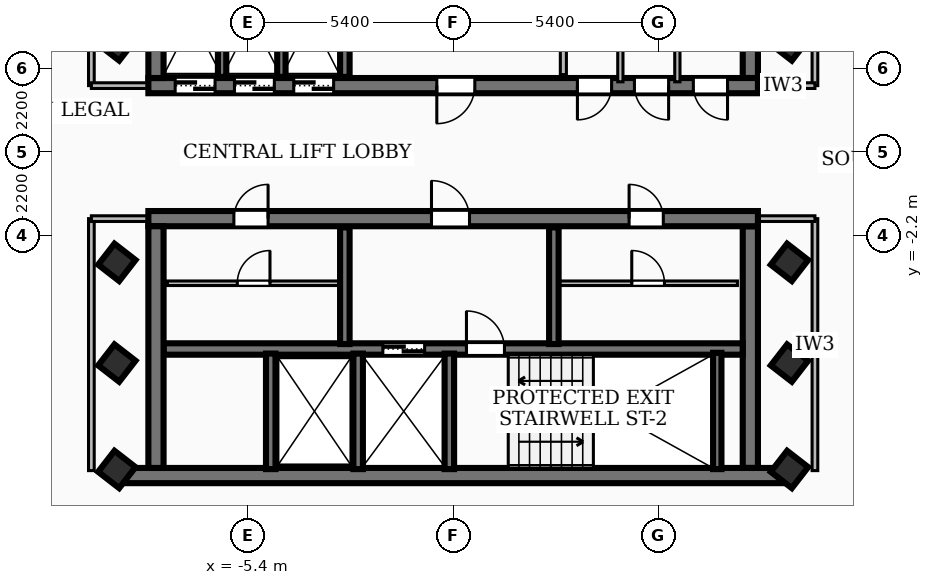
"""IFC4 building model, lengths in metres.
Left out: names, types, materials, properties, quantities, classifications, styles, units other than length and angle.
Written with IfcOpenShell. Run it as: python <this file> out.ifc"""

import sys

from ifc_helpers import new_model, si_unit, direction, frame, frame_2d, origin, origin_2d, place, context, subcontext, project, spatial, rectangle, extrude, element, fill, save


model = new_model("IFC4")
c1 = context("Model", 3, precision=1e-05, world=origin(), true_north=direction((0.0, 1.0)))
c2 = subcontext(c1, "Body", "Model", "MODEL_VIEW")
j1 = project(units=[si_unit("LENGTHUNIT", "METRE"), si_unit("PLANEANGLEUNIT", "RADIAN")], contexts=[c1])
p1 = place(None, origin())
s1 = spatial("IfcSite", under=j1, at=p1, CompositionType="ELEMENT")
p2 = place(p1, origin())
s2 = spatial("IfcBuilding", under=s1, at=p2, CompositionType="ELEMENT")
p3 = place(p2, frame((0.0, 0.0, 257.76)))
s3 = spatial("IfcBuildingStorey", under=s2, at=p3, CompositionType="ELEMENT", Elevation=257.76)
p4 = place(p3, frame((8.02, 1.75, 0.0), z_axis=(0.0, 0.0, 1.0), x_axis=(-1.0, 0.0, 0.0)))
e1 = element("IfcWall", 1, at=p4, inside=s3, PredefinedType="SHEAR", context=c2, shape_type="SweptSolid", body=[
    extrude(rectangle(XDim=16.04, YDim=0.4, at=frame_2d((8.02, 0.0))), origin(), (0.0, 0.0, 1.0), 3.16),
])
p5 = place(p4, frame((7.45, 0.0, 0.0)))
e2 = element("IfcOpeningElement", 2, at=p5, cuts=e1, PredefinedType="OPENING", context=c2, shape_type="SweptSolid", body=[
    extrude(rectangle(XDim=1.0, YDim=2.1, at=frame_2d((0.5, 1.05))), frame((0.0, 0.21, 0.0), z_axis=(0.0, -1.0, 0.0), x_axis=(1.0, 0.0, 0.0)), (0.0, 0.0, 1.0), 0.42),
])
p6 = place(p4, frame((14.285, 0.0, 0.0)))
e3 = element("IfcOpeningElement", 3, at=p6, cuts=e1, PredefinedType="OPENING", context=c2, shape_type="SweptSolid", body=[
    extrude(rectangle(XDim=1.05, YDim=2.15, at=frame_2d((0.525, 1.075))), frame((0.0, 0.21, 0.0), z_axis=(0.0, -1.0, 0.0), x_axis=(1.0, 0.0, 0.0)), (0.0, 0.0, 1.0), 0.42),
])
p7 = place(p4, frame((12.725, 0.0, 0.0)))
e4 = element("IfcOpeningElement", 4, at=p7, cuts=e1, PredefinedType="OPENING", context=c2, shape_type="SweptSolid", body=[
    extrude(rectangle(XDim=1.05, YDim=2.15, at=frame_2d((0.525, 1.075))), frame((0.0, 0.21, 0.0), z_axis=(0.0, -1.0, 0.0), x_axis=(1.0, 0.0, 0.0)), (0.0, 0.0, 1.0), 0.42),
])
p8 = place(p4, frame((11.165, 0.0, 0.0)))
e5 = element("IfcOpeningElement", 5, at=p8, cuts=e1, PredefinedType="OPENING", context=c2, shape_type="SweptSolid", body=[
    extrude(rectangle(XDim=1.05, YDim=2.15, at=frame_2d((0.525, 1.075))), frame((0.0, 0.21, 0.0), z_axis=(0.0, -1.0, 0.0), x_axis=(1.0, 0.0, 0.0)), (0.0, 0.0, 1.0), 0.42),
])
p9 = place(p4, frame((3.85, 0.0, 0.0)))
e6 = element("IfcOpeningElement", 6, at=p9, cuts=e1, PredefinedType="OPENING", context=c2, shape_type="SweptSolid", body=[
    extrude(rectangle(XDim=0.9, YDim=2.06, at=frame_2d((0.45, 1.03))), frame((0.0, 0.21, 0.0), z_axis=(0.0, -1.0, 0.0), x_axis=(1.0, 0.0, 0.0)), (0.0, 0.0, 1.0), 0.42),
])
p10 = place(p4, frame((2.35, 0.0, 0.0)))
e7 = element("IfcOpeningElement", 7, at=p10, cuts=e1, PredefinedType="OPENING", context=c2, shape_type="SweptSolid", body=[
    extrude(rectangle(XDim=0.9, YDim=2.06, at=frame_2d((0.45, 1.03))), frame((0.0, 0.21, 0.0), z_axis=(0.0, -1.0, 0.0), x_axis=(1.0, 0.0, 0.0)), (0.0, 0.0, 1.0), 0.42),
])
p11 = place(p4, frame((0.8, 0.0, 0.0)))
e8 = element("IfcOpeningElement", 8, at=p11, cuts=e1, PredefinedType="OPENING", context=c2, shape_type="SweptSolid", body=[
    extrude(rectangle(XDim=0.9, YDim=2.06, at=frame_2d((0.45, 1.03))), frame((0.0, 0.21, 0.0), z_axis=(0.0, -1.0, 0.0), x_axis=(1.0, 0.0, 0.0)), (0.0, 0.0, 1.0), 0.42),
])
for number, where, z_axis, x_axis in (
    (9, (-7.82, 1.95, 0.0), (0.0, 0.0, 1.0), (0.0, 1.0, 0.0)),
    (10, (7.82, 8.31, 0.0), (0.0, 0.0, 1.0), (0.0, -1.0, 0.0)),
):
    element("IfcWall", number, at=place(p3, frame(where, z_axis=z_axis, x_axis=x_axis)), inside=s3, PredefinedType="SHEAR", context=c2, shape_type="SweptSolid", body=[
        extrude(rectangle(XDim=6.36, YDim=0.4, at=frame_2d((3.18, 0.0))), origin(), (0.0, 0.0, 1.0), 3.16),
    ])
p12 = place(p3, frame((8.78, -8.51, 0.0), z_axis=(0.0, 0.0, 1.0), x_axis=(-1.0, 0.0, 0.0)))
e11 = element("IfcWall", 11, at=p12, inside=s3, PredefinedType="SHEAR", context=c2, shape_type="SweptSolid", body=[
    extrude(rectangle(XDim=17.56, YDim=0.4, at=frame_2d((8.78, 0.0))), origin(), (0.0, 0.0, 1.0), 3.16),
])
p13 = place(p3, frame((-8.02, -1.75, 0.0), z_axis=(0.0, 0.0, 1.0), x_axis=(1.0, 0.0, 0.0)))
e12 = element("IfcWall", 12, at=p13, inside=s3, PredefinedType="SHEAR", context=c2, shape_type="SweptSolid", body=[
    extrude(rectangle(XDim=16.04, YDim=0.4, at=frame_2d((8.02, 0.0))), origin(), (0.0, 0.0, 1.0), 3.16),
])
p14 = place(p13, frame((7.45, 0.0, 0.0)))
e13 = element("IfcOpeningElement", 13, at=p14, cuts=e12, PredefinedType="OPENING", context=c2, shape_type="SweptSolid", body=[
    extrude(rectangle(XDim=1.0, YDim=2.1, at=frame_2d((0.5, 1.05))), frame((0.0, 0.21, 0.0), z_axis=(0.0, -1.0, 0.0), x_axis=(1.0, 0.0, 0.0)), (0.0, 0.0, 1.0), 0.42),
])
p15 = place(p13, frame((12.65, 0.0, 0.0)))
e14 = element("IfcOpeningElement", 14, at=p15, cuts=e12, PredefinedType="OPENING", context=c2, shape_type="SweptSolid", body=[
    extrude(rectangle(XDim=0.9, YDim=2.06, at=frame_2d((0.45, 1.03))), frame((0.0, 0.21, 0.0), z_axis=(0.0, -1.0, 0.0), x_axis=(1.0, 0.0, 0.0)), (0.0, 0.0, 1.0), 0.42),
])
p16 = place(p13, frame((2.25, 0.0, 0.0)))
e15 = element("IfcOpeningElement", 15, at=p16, cuts=e12, PredefinedType="OPENING", context=c2, shape_type="SweptSolid", body=[
    extrude(rectangle(XDim=0.9, YDim=2.06, at=frame_2d((0.45, 1.03))), frame((0.0, 0.21, 0.0), z_axis=(0.0, -1.0, 0.0), x_axis=(1.0, 0.0, 0.0)), (0.0, 0.0, 1.0), 0.42),
])
for number, where, z_axis, x_axis in (
    (16, (-7.82, -8.31, 0.0), (0.0, 0.0, 1.0), (0.0, 1.0, 0.0)),
    (17, (7.82, -1.95, 0.0), (0.0, 0.0, 1.0), (0.0, -1.0, 0.0)),
):
    element("IfcWall", number, at=place(p3, frame(where, z_axis=z_axis, x_axis=x_axis)), inside=s3, PredefinedType="SHEAR", context=c2, shape_type="SweptSolid", body=[
        extrude(rectangle(XDim=6.36, YDim=0.4, at=frame_2d((3.18, 0.0))), origin(), (0.0, 0.0, 1.0), 3.16),
    ])
p17 = place(p3, frame((-7.62, -5.18, 0.0), z_axis=(0.0, 0.0, 1.0), x_axis=(1.0, 0.0, 0.0)))
e18 = element("IfcWall", 18, at=p17, inside=s3, PredefinedType="SOLIDWALL", context=c2, shape_type="SweptSolid", body=[
    extrude(rectangle(XDim=15.24, YDim=0.3, at=frame_2d((7.62, 0.0))), origin(), (0.0, 0.0, 1.0), 3.16),
])
p18 = place(p17, frame((5.77, 0.0, 0.0)))
e19 = element("IfcOpeningElement", 19, at=p18, cuts=e18, PredefinedType="OPENING", context=c2, shape_type="SweptSolid", body=[
    extrude(rectangle(XDim=1.1, YDim=2.15, at=frame_2d((0.55, 1.075))), frame((0.0, 0.16, 0.0), z_axis=(0.0, -1.0, 0.0), x_axis=(1.0, 0.0, 0.0)), (0.0, 0.0, 1.0), 0.32),
])
p19 = place(p17, frame((7.97, 0.0, 0.0)))
e20 = element("IfcOpeningElement", 20, at=p19, cuts=e18, PredefinedType="OPENING", context=c2, shape_type="SweptSolid", body=[
    extrude(rectangle(XDim=1.0, YDim=2.1, at=frame_2d((0.5, 1.05))), frame((0.0, 0.16, 0.0), z_axis=(0.0, -1.0, 0.0), x_axis=(1.0, 0.0, 0.0)), (0.0, 0.0, 1.0), 0.32),
])
p20 = place(p3, frame((6.95, -8.34, 0.0), z_axis=(0.0, 0.0, 1.0), x_axis=(0.0, 1.0, 0.0)))
e21 = element("IfcWall", 21, at=p20, inside=s3, PredefinedType="SOLIDWALL", context=c2, shape_type="SweptSolid", body=[
    extrude(rectangle(XDim=3.06, YDim=0.22, at=frame_2d((1.53, 0.0))), origin(), (0.0, 0.0, 1.0), 3.16),
])
p21 = place(p3, frame((-2.85, 1.98, 0.0), z_axis=(0.0, 0.0, 1.0), x_axis=(0.0, 1.0, 0.0)))
e22 = element("IfcWall", 22, at=p21, inside=s3, PredefinedType="SOLIDWALL", context=c2, shape_type="SweptSolid", body=[
    extrude(rectangle(XDim=3.07, YDim=0.25, at=frame_2d((1.535, 0.0))), origin(), (0.0, 0.0, 1.0), 3.16),
])
for number, where, z_axis, x_axis in (
    (23, (-0.1, -8.34, 0.0), (0.0, 0.0, 1.0), (0.0, 1.0, 0.0)),
    (24, (-2.5, -8.34, 0.0), (0.0, 0.0, 1.0), (0.0, 1.0, 0.0)),
    (25, (-4.8, -8.34, 0.0), (0.0, 0.0, 1.0), (0.0, 1.0, 0.0)),
):
    element("IfcWall", number, at=place(p3, frame(where, z_axis=z_axis, x_axis=x_axis)), inside=s3, PredefinedType="SOLIDWALL", context=c2, shape_type="SweptSolid", body=[
        extrude(rectangle(XDim=3.04, YDim=0.25, at=frame_2d((1.52, 0.0))), origin(), (0.0, 0.0, 1.0), 3.16),
    ])
for number, where, z_axis, x_axis in (
    (26, (-2.85, -5.05, 0.0), (0.0, 0.0, 1.0), (0.0, 1.0, 0.0)),
    (27, (2.65, -5.05, 0.0), (0.0, 0.0, 1.0), (0.0, 1.0, 0.0)),
):
    element("IfcWall", number, at=place(p3, frame(where, z_axis=z_axis, x_axis=x_axis)), inside=s3, PredefinedType="SOLIDWALL", context=c2, shape_type="SweptSolid", body=[
        extrude(rectangle(XDim=3.07, YDim=0.25, at=frame_2d((1.535, 0.0))), origin(), (0.0, 0.0, 1.0), 3.16),
    ])
for number, where, z_axis, x_axis in (
    (28, (-6.08, 1.98, 0.0), (0.0, 0.0, 1.0), (0.0, 1.0, 0.0)),
    (29, (-4.52, 1.98, 0.0), (0.0, 0.0, 1.0), (0.0, 1.0, 0.0)),
):
    element("IfcWall", number, at=place(p3, frame(where, z_axis=z_axis, x_axis=x_axis)), inside=s3, PredefinedType="SOLIDWALL", context=c2, shape_type="SweptSolid", body=[
        extrude(rectangle(XDim=3.07, YDim=0.22, at=frame_2d((1.535, 0.0))), origin(), (0.0, 0.0, 1.0), 3.16),
    ])
for number, where, z_axis, x_axis in (
    (30, (-8.85, -5.55, 0.0), (0.0, 0.0, 1.0), (0.613, 0.79, 0.0)),
    (31, (-8.85, -2.9, 0.0), (0.0, 0.0, 1.0), (0.613, 0.79, 0.0)),
    (32, (-8.85, 2.9, 0.0), (0.0, 0.0, 1.0), (0.613, 0.79, 0.0)),
    (33, (8.85, -5.55, 0.0), (0.0, 0.0, 1.0), (0.613, 0.79, 0.0)),
    (34, (8.85, -2.9, 0.0), (0.0, 0.0, 1.0), (0.613, 0.79, 0.0)),
    (35, (8.85, 2.9, 0.0), (0.0, 0.0, 1.0), (0.613, 0.79, 0.0)),
    (36, (8.85, -8.35, 0.0), (0.0, 0.0, 1.0), (0.613, 0.79, 0.0)),
    (37, (-8.85, -8.35, 0.0), (0.0, 0.0, 1.0), (0.613, 0.79, 0.0)),
):
    element("IfcColumn", number, at=place(p3, frame(where, z_axis=z_axis, x_axis=x_axis)), inside=s3, PredefinedType="COLUMN", context=c2, shape_type="SweptSolid", body=[
        extrude(rectangle(XDim=0.7, YDim=0.7, at=origin_2d()), origin(), (0.0, 0.0, 1.0), 3.42),
    ])
p22 = place(p3, frame((2.9, 2.04, 0.0), z_axis=(0.0, 0.0, 1.0), x_axis=(0.0, 1.0, 0.0)))
e38 = element("IfcWall", 38, at=p22, inside=s3, PredefinedType="PARTITIONING", context=c2, shape_type="SweptSolid", body=[
    extrude(rectangle(XDim=2.94, YDim=0.16, at=frame_2d((1.47, 0.0))), origin(), (0.0, 0.0, 1.0), 2.39),
])
p23 = place(p22, frame((1.82, 0.0, 0.0)))
e39 = element("IfcOpeningElement", 39, at=p23, cuts=e38, PredefinedType="OPENING", context=c2, shape_type="SweptSolid", body=[
    extrude(rectangle(XDim=0.9, YDim=2.06, at=frame_2d((0.45, 1.03))), frame((0.0, 0.09, 0.0), z_axis=(0.0, -1.0, 0.0), x_axis=(1.0, 0.0, 0.0)), (0.0, 0.0, 1.0), 0.18),
])
p24 = place(p3, frame((2.8, -3.45, 0.0), z_axis=(0.0, 0.0, 1.0), x_axis=(1.0, 0.0, 0.0)))
e40 = element("IfcWall", 40, at=p24, inside=s3, PredefinedType="PARTITIONING", context=c2, shape_type="SweptSolid", body=[
    extrude(rectangle(XDim=4.68, YDim=0.12, at=frame_2d((2.34, 0.0))), origin(), (0.0, 0.0, 1.0), 3.16),
])
p25 = place(p24, frame((1.9, 0.0, 0.0)))
e41 = element("IfcOpeningElement", 41, at=p25, cuts=e40, PredefinedType="OPENING", context=c2, shape_type="SweptSolid", body=[
    extrude(rectangle(XDim=0.86, YDim=2.04, at=frame_2d((0.43, 1.02))), frame((0.0, 0.07, 0.0), z_axis=(0.0, -1.0, 0.0), x_axis=(1.0, 0.0, 0.0)), (0.0, 0.0, 1.0), 0.14),
])
p26 = place(p3, frame((-7.52, -3.45, 0.0), z_axis=(0.0, 0.0, 1.0), x_axis=(1.0, 0.0, 0.0)))
e42 = element("IfcWall", 42, at=p26, inside=s3, PredefinedType="PARTITIONING", context=c2, shape_type="SweptSolid", body=[
    extrude(rectangle(XDim=4.54, YDim=0.12, at=frame_2d((2.27, 0.0))), origin(), (0.0, 0.0, 1.0), 3.16),
])
p27 = place(p26, frame((1.84, 0.0, 0.0)))
e43 = element("IfcOpeningElement", 43, at=p27, cuts=e42, PredefinedType="OPENING", context=c2, shape_type="SweptSolid", body=[
    extrude(rectangle(XDim=0.86, YDim=2.04, at=frame_2d((0.43, 1.02))), frame((0.0, 0.07, 0.0), z_axis=(0.0, -1.0, 0.0), x_axis=(1.0, 0.0, 0.0)), (0.0, 0.0, 1.0), 0.14),
])
for number, where, z_axis, x_axis in (
    (44, (4.4, 1.85, 0.0), (0.0, 0.0, 1.0), (0.0, 1.0, 0.0)),
    (45, (5.9, 1.85, 0.0), (0.0, 0.0, 1.0), (0.0, 1.0, 0.0)),
):
    element("IfcWall", number, at=place(p3, frame(where, z_axis=z_axis, x_axis=x_axis)), inside=s3, PredefinedType="PARTITIONING", context=c2, shape_type="SweptSolid", body=[
        extrude(rectangle(XDim=1.89, YDim=0.138, at=frame_2d((0.945, 0.0))), origin(), (0.0, 0.0, 1.0), 2.39),
    ])
p28 = place(p3, frame((-9.52, 1.75, 0.0), z_axis=(0.0, 0.0, 1.0), x_axis=(0.0, 1.0, 0.0)))
e46 = element("IfcWall", 46, at=p28, inside=s3, PredefinedType="PARTITIONING", context=c2, shape_type="SweptSolid", body=[
    extrude(rectangle(XDim=6.63, YDim=0.15, at=frame_2d((3.315, 0.0))), origin(), (0.0, 0.0, 1.0), 2.53),
])
p29 = place(p3, frame((-7.85, 1.75, 0.0), z_axis=(0.0, 0.0, 1.0), x_axis=(-1.0, 0.0, 0.0)))
e47 = element("IfcWall", 47, at=p29, inside=s3, PredefinedType="PARTITIONING", context=c2, shape_type="SweptSolid", body=[
    extrude(rectangle(XDim=1.67, YDim=0.15, at=frame_2d((0.835, 0.0))), origin(), (0.0, 0.0, 1.0), 2.39),
])
p30 = place(p3, frame((-9.52, -8.38, 0.0), z_axis=(0.0, 0.0, 1.0), x_axis=(0.0, 1.0, 0.0)))
e48 = element("IfcWall", 48, at=p30, inside=s3, PredefinedType="PARTITIONING", context=c2, shape_type="SweptSolid", body=[
    extrude(rectangle(XDim=6.63, YDim=0.15, at=frame_2d((3.315, 0.0))), origin(), (0.0, 0.0, 1.0), 3.16),
])
p31 = place(p3, frame((-7.85, -1.75, 0.0), z_axis=(0.0, 0.0, 1.0), x_axis=(-1.0, 0.0, 0.0)))
e49 = element("IfcWall", 49, at=p31, inside=s3, PredefinedType="PARTITIONING", context=c2, shape_type="SweptSolid", body=[
    extrude(rectangle(XDim=1.67, YDim=0.15, at=frame_2d((0.835, 0.0))), origin(), (0.0, 0.0, 1.0), 2.39),
])
p32 = place(p3, frame((9.52, 1.75, 0.0), z_axis=(0.0, 0.0, 1.0), x_axis=(0.0, 1.0, 0.0)))
e50 = element("IfcWall", 50, at=p32, inside=s3, PredefinedType="PARTITIONING", context=c2, shape_type="SweptSolid", body=[
    extrude(rectangle(XDim=6.63, YDim=0.15, at=frame_2d((3.315, 0.0))), origin(), (0.0, 0.0, 1.0), 3.16),
])
p33 = place(p3, frame((7.85, 1.75, 0.0), z_axis=(0.0, 0.0, 1.0), x_axis=(1.0, 0.0, 0.0)))
e51 = element("IfcWall", 51, at=p33, inside=s3, PredefinedType="PARTITIONING", context=c2, shape_type="SweptSolid", body=[
    extrude(rectangle(XDim=1.67, YDim=0.15, at=frame_2d((0.835, 0.0))), origin(), (0.0, 0.0, 1.0), 2.39),
])
p34 = place(p3, frame((9.52, -8.38, 0.0), z_axis=(0.0, 0.0, 1.0), x_axis=(0.0, 1.0, 0.0)))
e52 = element("IfcWall", 52, at=p34, inside=s3, PredefinedType="PARTITIONING", context=c2, shape_type="SweptSolid", body=[
    extrude(rectangle(XDim=6.63, YDim=0.15, at=frame_2d((3.315, 0.0))), origin(), (0.0, 0.0, 1.0), 2.53),
])
p35 = place(p3, frame((7.85, -1.75, 0.0), z_axis=(0.0, 0.0, 1.0), x_axis=(1.0, 0.0, 0.0)))
e53 = element("IfcWall", 53, at=p35, inside=s3, PredefinedType="PARTITIONING", context=c2, shape_type="SweptSolid", body=[
    extrude(rectangle(XDim=1.67, YDim=0.15, at=frame_2d((0.835, 0.0))), origin(), (0.0, 0.0, 1.0), 2.39),
])
p36 = place(p3, frame((-17.555, 0.683, 0.0), z_axis=(0.0, 0.0, 1.0), x_axis=(0.61291959311, 0.790145285617, 0.0)))
e54 = element("IfcWall", 54, at=p36, inside=s3, PredefinedType="PARTITIONING", context=c2, shape_type="SweptSolid", body=[
    extrude(rectangle(XDim=20.239, YDim=0.12, at=frame_2d((10.12, 0.0))), origin(), (0.0, 0.0, 1.0), 2.53),
])
p37 = place(p36, frame((9.96, 0.0, 0.0)))
e55 = element("IfcOpeningElement", 55, at=p37, cuts=e54, PredefinedType="OPENING", context=c2, shape_type="SweptSolid", body=[
    extrude(rectangle(XDim=0.86, YDim=2.04, at=frame_2d((0.43, 1.02))), frame((0.0, 0.07, 0.0), z_axis=(0.0, -1.0, 0.0), x_axis=(1.0, 0.0, 0.0)), (0.0, 0.0, 1.0), 0.14),
])
p38 = place(p36, frame((8.52, 0.0, 0.0)))
e56 = element("IfcOpeningElement", 56, at=p38, cuts=e54, PredefinedType="OPENING", context=c2, shape_type="SweptSolid", body=[
    extrude(rectangle(XDim=0.86, YDim=2.04, at=frame_2d((0.43, 1.02))), frame((0.0, 0.07, 0.0), z_axis=(0.0, -1.0, 0.0), x_axis=(1.0, 0.0, 0.0)), (0.0, 0.0, 1.0), 0.14),
])
p39 = place(p3, frame((17.555, -0.683, 0.0), z_axis=(0.0, 0.0, 1.0), x_axis=(-0.61291959311, -0.790145285617, 0.0)))
e57 = element("IfcWall", 57, at=p39, inside=s3, PredefinedType="PARTITIONING", context=c2, shape_type="SweptSolid", body=[
    extrude(rectangle(XDim=20.239, YDim=0.12, at=frame_2d((10.12, 0.0))), origin(), (0.0, 0.0, 1.0), 2.53),
])
p40 = place(p39, frame((9.96, 0.0, 0.0)))
e58 = element("IfcOpeningElement", 58, at=p40, cuts=e57, PredefinedType="OPENING", context=c2, shape_type="SweptSolid", body=[
    extrude(rectangle(XDim=0.86, YDim=2.04, at=frame_2d((0.43, 1.02))), frame((0.0, 0.07, 0.0), z_axis=(0.0, -1.0, 0.0), x_axis=(1.0, 0.0, 0.0)), (0.0, 0.0, 1.0), 0.14),
])
p41 = place(p39, frame((8.52, 0.0, 0.0)))
e59 = element("IfcOpeningElement", 59, at=p41, cuts=e57, PredefinedType="OPENING", context=c2, shape_type="SweptSolid", body=[
    extrude(rectangle(XDim=0.86, YDim=2.04, at=frame_2d((0.43, 1.02))), frame((0.0, 0.07, 0.0), z_axis=(0.0, -1.0, 0.0), x_axis=(1.0, 0.0, 0.0)), (0.0, 0.0, 1.0), 0.14),
])
p42 = place(p5, origin())
e60 = element("IfcDoor", 60, at=p42, inside=s3, OperationType="SINGLE_SWING_RIGHT", PredefinedType="DOOR", context=c2, shape_type="SweptSolid", body=[
    extrude(rectangle(XDim=1.0, YDim=2.1, at=frame_2d((0.5, 1.05))), frame((0.0, 0.025, 0.0), z_axis=(0.0, -1.0, 0.0), x_axis=(1.0, 0.0, 0.0)), (0.0, 0.0, 1.0), 0.05),
])
fill(e2, e60)
p43 = place(p14, origin())
e61 = element("IfcDoor", 61, at=p43, inside=s3, OperationType="SINGLE_SWING_LEFT", PredefinedType="DOOR", context=c2, shape_type="SweptSolid", body=[
    extrude(rectangle(XDim=1.0, YDim=2.1, at=frame_2d((0.5, 1.05))), frame((0.0, 0.025, 0.0), z_axis=(0.0, -1.0, 0.0), x_axis=(1.0, 0.0, 0.0)), (0.0, 0.0, 1.0), 0.05),
])
fill(e13, e61)
p44 = place(p18, origin())
e62 = element("IfcDoor", 62, at=p44, inside=s3, OperationType="DOUBLE_DOOR_SLIDING", PredefinedType="DOOR", context=c2, shape_type="SweptSolid", body=[
    extrude(rectangle(XDim=1.1, YDim=2.15, at=frame_2d((0.55, 1.075))), frame((0.0, 0.025, 0.0), z_axis=(0.0, -1.0, 0.0), x_axis=(1.0, 0.0, 0.0)), (0.0, 0.0, 1.0), 0.05),
])
fill(e19, e62)
p45 = place(p19, origin())
e63 = element("IfcDoor", 63, at=p45, inside=s3, OperationType="SINGLE_SWING_LEFT", PredefinedType="DOOR", context=c2, shape_type="SweptSolid", body=[
    extrude(rectangle(XDim=1.0, YDim=2.1, at=frame_2d((0.5, 1.05))), frame((0.0, 0.025, 0.0), z_axis=(0.0, -1.0, 0.0), x_axis=(1.0, 0.0, 0.0)), (0.0, 0.0, 1.0), 0.05),
])
fill(e20, e63)
p46 = place(p6, origin())
e64 = element("IfcDoor", 64, at=p46, inside=s3, OperationType="DOUBLE_DOOR_SLIDING", PredefinedType="DOOR", context=c2, shape_type="SweptSolid", body=[
    extrude(rectangle(XDim=1.05, YDim=2.15, at=frame_2d((0.525, 1.075))), frame((0.0, 0.025, 0.0), z_axis=(0.0, -1.0, 0.0), x_axis=(1.0, 0.0, 0.0)), (0.0, 0.0, 1.0), 0.05),
])
fill(e3, e64)
p47 = place(p7, origin())
e65 = element("IfcDoor", 65, at=p47, inside=s3, OperationType="DOUBLE_DOOR_SLIDING", PredefinedType="DOOR", context=c2, shape_type="SweptSolid", body=[
    extrude(rectangle(XDim=1.05, YDim=2.15, at=frame_2d((0.525, 1.075))), frame((0.0, 0.025, 0.0), z_axis=(0.0, -1.0, 0.0), x_axis=(1.0, 0.0, 0.0)), (0.0, 0.0, 1.0), 0.05),
])
fill(e4, e65)
p48 = place(p8, origin())
e66 = element("IfcDoor", 66, at=p48, inside=s3, OperationType="DOUBLE_DOOR_SLIDING", PredefinedType="DOOR", context=c2, shape_type="SweptSolid", body=[
    extrude(rectangle(XDim=1.05, YDim=2.15, at=frame_2d((0.525, 1.075))), frame((0.0, 0.025, 0.0), z_axis=(0.0, -1.0, 0.0), x_axis=(1.0, 0.0, 0.0)), (0.0, 0.0, 1.0), 0.05),
])
fill(e5, e66)
p49 = place(p15, origin())
e67 = element("IfcDoor", 67, at=p49, inside=s3, OperationType="SINGLE_SWING_LEFT", PredefinedType="DOOR", context=c2, shape_type="SweptSolid", body=[
    extrude(rectangle(XDim=0.9, YDim=2.06, at=frame_2d((0.45, 1.03))), frame((0.0, 0.025, 0.0), z_axis=(0.0, -1.0, 0.0), x_axis=(1.0, 0.0, 0.0)), (0.0, 0.0, 1.0), 0.05),
])
fill(e14, e67)
p50 = place(p16, origin())
e68 = element("IfcDoor", 68, at=p50, inside=s3, OperationType="SINGLE_SWING_RIGHT", PredefinedType="DOOR", context=c2, shape_type="SweptSolid", body=[
    extrude(rectangle(XDim=0.9, YDim=2.06, at=frame_2d((0.45, 1.03))), frame((0.0, 0.025, 0.0), z_axis=(0.0, -1.0, 0.0), x_axis=(1.0, 0.0, 0.0)), (0.0, 0.0, 1.0), 0.05),
])
fill(e15, e68)
p51 = place(p9, origin())
e69 = element("IfcDoor", 69, at=p51, inside=s3, OperationType="SINGLE_SWING_RIGHT", PredefinedType="DOOR", context=c2, shape_type="SweptSolid", body=[
    extrude(rectangle(XDim=0.9, YDim=2.06, at=frame_2d((0.45, 1.03))), frame((0.0, 0.025, 0.0), z_axis=(0.0, -1.0, 0.0), x_axis=(1.0, 0.0, 0.0)), (0.0, 0.0, 1.0), 0.05),
])
fill(e6, e69)
p52 = place(p10, origin())
e70 = element("IfcDoor", 70, at=p52, inside=s3, OperationType="SINGLE_SWING_LEFT", PredefinedType="DOOR", context=c2, shape_type="SweptSolid", body=[
    extrude(rectangle(XDim=0.9, YDim=2.06, at=frame_2d((0.45, 1.03))), frame((0.0, 0.025, 0.0), z_axis=(0.0, -1.0, 0.0), x_axis=(1.0, 0.0, 0.0)), (0.0, 0.0, 1.0), 0.05),
])
fill(e7, e70)
p53 = place(p11, origin())
e71 = element("IfcDoor", 71, at=p53, inside=s3, OperationType="SINGLE_SWING_LEFT", PredefinedType="DOOR", context=c2, shape_type="SweptSolid", body=[
    extrude(rectangle(XDim=0.9, YDim=2.06, at=frame_2d((0.45, 1.03))), frame((0.0, 0.025, 0.0), z_axis=(0.0, -1.0, 0.0), x_axis=(1.0, 0.0, 0.0)), (0.0, 0.0, 1.0), 0.05),
])
fill(e8, e71)
p54 = place(p25, origin())
e72 = element("IfcDoor", 72, at=p54, inside=s3, OperationType="SINGLE_SWING_LEFT", PredefinedType="DOOR", context=c2, shape_type="SweptSolid", body=[
    extrude(rectangle(XDim=0.86, YDim=2.04, at=frame_2d((0.43, 1.02))), frame((0.0, 0.025, 0.0), z_axis=(0.0, -1.0, 0.0), x_axis=(1.0, 0.0, 0.0)), (0.0, 0.0, 1.0), 0.05),
])
fill(e41, e72)
p55 = place(p27, origin())
e73 = element("IfcDoor", 73, at=p55, inside=s3, OperationType="SINGLE_SWING_RIGHT", PredefinedType="DOOR", context=c2, shape_type="SweptSolid", body=[
    extrude(rectangle(XDim=0.86, YDim=2.04, at=frame_2d((0.43, 1.02))), frame((0.0, 0.025, 0.0), z_axis=(0.0, -1.0, 0.0), x_axis=(1.0, 0.0, 0.0)), (0.0, 0.0, 1.0), 0.05),
])
fill(e43, e73)
save(model, sys.argv[1])
